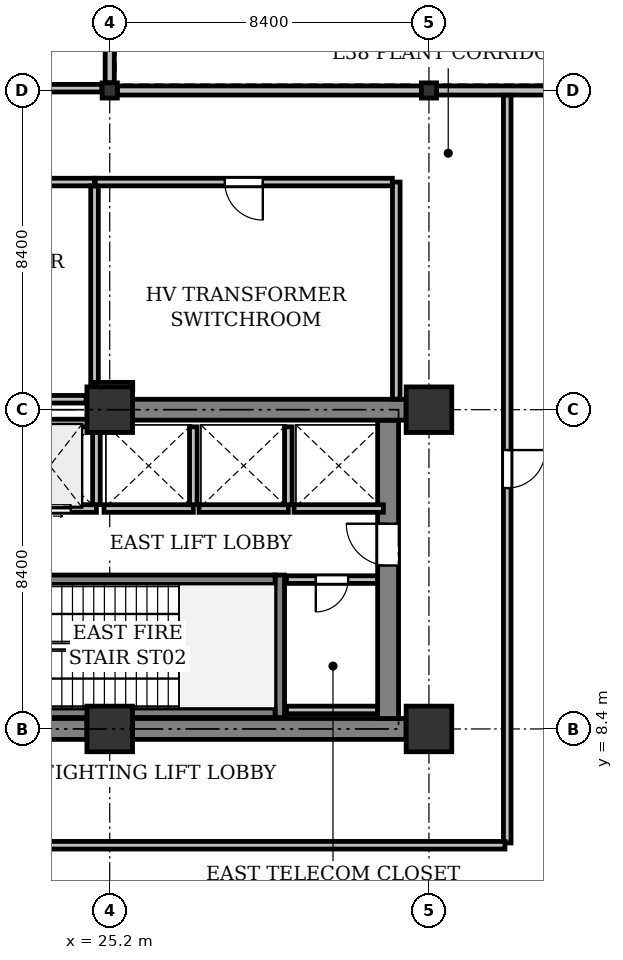
"""IFC4 building model, lengths in metres.
Left out: names, types, materials, properties, quantities, classifications, styles, units other than length and angle.
Written with IfcOpenShell. Run it as: python <this file> out.ifc"""

import sys

from ifc_helpers import new_model, si_unit, direction, frame, frame_2d, origin, origin_2d, place, context, subcontext, project, spatial, rectangle, i_section, extrude, element, fill, save


model = new_model("IFC4")
c1 = context("Model", 3, precision=1e-05, world=origin(), true_north=direction((0.0, 1.0)))
c2 = subcontext(c1, "Body", "Model", "MODEL_VIEW")
j1 = project(units=[si_unit("LENGTHUNIT", "METRE"), si_unit("PLANEANGLEUNIT", "RADIAN")], contexts=[c1])
p1 = place(None, origin())
s1 = spatial("IfcSite", under=j1, at=p1, CompositionType="ELEMENT")
p2 = place(p1, origin())
s2 = spatial("IfcBuilding", under=s1, at=p2, CompositionType="ELEMENT")
p3 = place(p2, frame((0.0, 0.0, 162.3)))
s3 = spatial("IfcBuildingStorey", under=s2, at=p3, CompositionType="ELEMENT", Elevation=162.3)
for number, where, z_axis, x_axis in (
    (1, (25.2, 8.4, 0.0), (0.0, 0.0, 1.0), (1.0, 0.0, 0.0)),
    (2, (25.2, 16.8, 0.0), (0.0, 0.0, 1.0), (1.0, 0.0, 0.0)),
):
    element("IfcColumn", number, at=place(p3, frame(where, z_axis=z_axis, x_axis=x_axis)), inside=s3, PredefinedType="COLUMN", context=c2, shape_type="SweptSolid", body=[
        extrude(rectangle(XDim=1.2, YDim=1.2, at=origin_2d()), origin(), (0.0, 0.0, 1.0), 5.0),
    ])
p4 = place(p3, frame((25.2, 25.2, 0.0), z_axis=(0.0, 0.0, 1.0), x_axis=(1.0, 0.0, 0.0)))
e3 = element("IfcColumn", 3, at=p4, inside=s3, PredefinedType="COLUMN", context=c2, shape_type="SweptSolid", body=[
    extrude(i_section(OverallWidth=0.4, OverallDepth=0.4, WebThickness=0.025, FlangeThickness=0.04, at=origin_2d()), origin(), (0.0, 0.0, 1.0), 5.0),
])
for number, where, z_axis, x_axis in (
    (4, (33.6, 8.4, 0.0), (0.0, 0.0, 1.0), (1.0, 0.0, 0.0)),
    (5, (33.6, 16.8, 0.0), (0.0, 0.0, 1.0), (1.0, 0.0, 0.0)),
):
    element("IfcColumn", number, at=place(p3, frame(where, z_axis=z_axis, x_axis=x_axis)), inside=s3, PredefinedType="COLUMN", context=c2, shape_type="SweptSolid", body=[
        extrude(rectangle(XDim=1.2, YDim=1.2, at=origin_2d()), origin(), (0.0, 0.0, 1.0), 5.0),
    ])
p5 = place(p3, frame((33.6, 25.2, 0.0), z_axis=(0.0, 0.0, 1.0), x_axis=(1.0, 0.0, 0.0)))
e6 = element("IfcColumn", 6, at=p5, inside=s3, PredefinedType="COLUMN", context=c2, shape_type="SweptSolid", body=[
    extrude(i_section(OverallWidth=0.4, OverallDepth=0.4, WebThickness=0.025, FlangeThickness=0.04, at=origin_2d()), origin(), (0.0, 0.0, 1.0), 5.0),
])
for number, where, z_axis, x_axis in (
    (7, (25.2, 33.4, 0.0), (0.0, 0.0, 1.0), (0.0, -1.0, 0.0)),
    (8, (25.4, 25.2, 0.0), (0.0, 0.0, 1.0), (1.0, 0.0, 0.0)),
    (9, (33.8, 25.2, 0.0), (0.0, 0.0, 1.0), (1.0, 0.0, 0.0)),
):
    element("IfcWall", number, at=place(p3, frame(where, z_axis=z_axis, x_axis=x_axis)), inside=s3, PredefinedType="STANDARD", context=c2, shape_type="SweptSolid", body=[
        extrude(rectangle(XDim=8.0, YDim=0.24, at=frame_2d((4.0, 0.0))), origin(), (0.0, 0.0, 1.0), 4.425),
    ])
p6 = place(p3, frame((17.4, 8.4, 0.0), z_axis=(0.0, 0.0, 1.0), x_axis=(1.0, 0.0, 0.0)))
e10 = element("IfcWall", 10, at=p6, inside=s3, PredefinedType="SHEAR", context=c2, shape_type="SweptSolid", body=[
    extrude(rectangle(XDim=7.2, YDim=0.55, at=frame_2d((3.6, 0.0))), origin(), (0.0, 0.0, 1.0), 4.725),
])
p7 = place(p3, frame((25.8, 8.4, 0.0), z_axis=(0.0, 0.0, 1.0), x_axis=(1.0, 0.0, 0.0)))
e11 = element("IfcWall", 11, at=p7, inside=s3, PredefinedType="SHEAR", context=c2, shape_type="SweptSolid", body=[
    extrude(rectangle(XDim=7.2, YDim=0.55, at=frame_2d((3.6, 0.0))), origin(), (0.0, 0.0, 1.0), 4.725),
])
p8 = place(p3, frame((32.525, 8.675, 0.0), z_axis=(0.0, 0.0, 1.0), x_axis=(0.0, 1.0, 0.0)))
e12 = element("IfcWall", 12, at=p8, inside=s3, PredefinedType="SHEAR", context=c2, shape_type="SweptSolid", body=[
    extrude(rectangle(XDim=7.85, YDim=0.55, at=frame_2d((3.925, 0.0))), origin(), (0.0, 0.0, 1.0), 4.725),
])
p9 = place(p8, frame((4.025, 0.0, 0.0)))
e13 = element("IfcOpeningElement", 13, at=p9, cuts=e12, PredefinedType="OPENING", context=c2, shape_type="SweptSolid", body=[
    extrude(rectangle(XDim=1.1, YDim=2.15, at=frame_2d((0.55, 1.075))), frame((0.0, 0.285, 0.0), z_axis=(0.0, -1.0, 0.0), x_axis=(1.0, 0.0, 0.0)), (0.0, 0.0, 1.0), 0.57),
])
p10 = place(p3, frame((25.8, 16.8, 0.0), z_axis=(0.0, 0.0, 1.0), x_axis=(1.0, 0.0, 0.0)))
e14 = element("IfcWall", 14, at=p10, inside=s3, PredefinedType="SHEAR", context=c2, shape_type="SweptSolid", body=[
    extrude(rectangle(XDim=7.2, YDim=0.55, at=frame_2d((3.6, 0.0))), origin(), (0.0, 0.0, 1.0), 4.725),
])
p11 = place(p3, frame((29.675, 8.7, 0.0), z_axis=(0.0, 0.0, 1.0), x_axis=(0.0, 1.0, 0.0)))
e15 = element("IfcWall", 15, at=p11, inside=s3, PredefinedType="SHEAR", context=c2, shape_type="SweptSolid", body=[
    extrude(rectangle(XDim=3.75, YDim=0.25, at=frame_2d((1.875, 0.0))), origin(), (0.0, 0.0, 1.0), 4.725),
])
p12 = place(p3, frame((21.8, 8.825, 0.0), z_axis=(0.0, 0.0, 1.0), x_axis=(1.0, 0.0, 0.0)))
e16 = element("IfcWall", 16, at=p12, inside=s3, PredefinedType="SHEAR", context=c2, shape_type="SweptSolid", body=[
    extrude(rectangle(XDim=7.75, YDim=0.25, at=frame_2d((3.875, 0.0))), origin(), (0.0, 0.0, 1.0), 4.725),
])
p13 = place(p3, frame((21.8, 12.325, 0.0), z_axis=(0.0, 0.0, 1.0), x_axis=(1.0, 0.0, 0.0)))
e17 = element("IfcWall", 17, at=p13, inside=s3, PredefinedType="SHEAR", context=c2, shape_type="SweptSolid", body=[
    extrude(rectangle(XDim=7.75, YDim=0.25, at=frame_2d((3.875, 0.0))), origin(), (0.0, 0.0, 1.0), 4.725),
])
p14 = place(p13, frame((0.22, 0.0, 0.0)))
e18 = element("IfcOpeningElement", 18, at=p14, cuts=e17, PredefinedType="OPENING", context=c2, shape_type="SweptSolid", body=[
    extrude(rectangle(XDim=1.1, YDim=2.15, at=frame_2d((0.55, 1.075))), frame((0.0, 0.135, 0.0), z_axis=(0.0, -1.0, 0.0), x_axis=(1.0, 0.0, 0.0)), (0.0, 0.0, 1.0), 0.27),
])
p15 = place(p3, frame((22.4, 14.2, 0.0), z_axis=(0.0, 0.0, 1.0), x_axis=(1.0, 0.0, 0.0)))
e19 = element("IfcWall", 19, at=p15, inside=s3, PredefinedType="PARTITIONING", context=c2, shape_type="SweptSolid", body=[
    extrude(rectangle(XDim=2.45, YDim=0.2, at=frame_2d((1.225, 0.0))), origin(), (0.0, 0.0, 1.0), 4.725),
])
p16 = place(p15, frame((0.675, 0.0, 0.0)))
e20 = element("IfcOpeningElement", 20, at=p16, cuts=e19, PredefinedType="OPENING", context=c2, shape_type="SweptSolid", body=[
    extrude(rectangle(XDim=1.1, YDim=2.2, at=frame_2d((0.55, 1.1))), frame((0.0, 0.11, 0.0), z_axis=(0.0, -1.0, 0.0), x_axis=(1.0, 0.0, 0.0)), (0.0, 0.0, 1.0), 0.22),
])
p17 = place(p3, frame((24.85, 14.3, 0.0), z_axis=(0.0, 0.0, 1.0), x_axis=(0.0, 1.0, 0.0)))
e21 = element("IfcWall", 21, at=p17, inside=s3, PredefinedType="PARTITIONING", context=c2, shape_type="SweptSolid", body=[
    extrude(rectangle(XDim=2.05, YDim=0.2, at=frame_2d((1.025, 0.0))), origin(), (0.0, 0.0, 1.0), 4.725),
])
p18 = place(p3, frame((22.5, 16.45, 0.0), z_axis=(0.0, 0.0, 1.0), x_axis=(1.0, 0.0, 0.0)))
e22 = element("IfcWall", 22, at=p18, inside=s3, PredefinedType="PARTITIONING", context=c2, shape_type="SweptSolid", body=[
    extrude(rectangle(XDim=2.25, YDim=0.2, at=frame_2d((1.125, 0.0))), origin(), (0.0, 0.0, 1.0), 4.725),
])
p19 = place(p3, frame((25.05, 14.2, 0.0), z_axis=(0.0, 0.0, 1.0), x_axis=(1.0, 0.0, 0.0)))
e23 = element("IfcWall", 23, at=p19, inside=s3, PredefinedType="PARTITIONING", context=c2, shape_type="SweptSolid", body=[
    extrude(rectangle(XDim=2.35, YDim=0.2, at=frame_2d((1.175, 0.0))), origin(), (0.0, 0.0, 1.0), 4.725),
])
p20 = place(p3, frame((27.4, 14.3, 0.0), z_axis=(0.0, 0.0, 1.0), x_axis=(0.0, 1.0, 0.0)))
e24 = element("IfcWall", 24, at=p20, inside=s3, PredefinedType="PARTITIONING", context=c2, shape_type="SweptSolid", body=[
    extrude(rectangle(XDim=2.05, YDim=0.2, at=frame_2d((1.025, 0.0))), origin(), (0.0, 0.0, 1.0), 4.725),
])
p21 = place(p3, frame((27.55, 14.2, 0.0), z_axis=(0.0, 0.0, 1.0), x_axis=(1.0, 0.0, 0.0)))
e25 = element("IfcWall", 25, at=p21, inside=s3, PredefinedType="PARTITIONING", context=c2, shape_type="SweptSolid", body=[
    extrude(rectangle(XDim=2.35, YDim=0.2, at=frame_2d((1.175, 0.0))), origin(), (0.0, 0.0, 1.0), 4.725),
])
p22 = place(p3, frame((29.9, 14.3, 0.0), z_axis=(0.0, 0.0, 1.0), x_axis=(0.0, 1.0, 0.0)))
e26 = element("IfcWall", 26, at=p22, inside=s3, PredefinedType="PARTITIONING", context=c2, shape_type="SweptSolid", body=[
    extrude(rectangle(XDim=2.05, YDim=0.2, at=frame_2d((1.025, 0.0))), origin(), (0.0, 0.0, 1.0), 4.725),
])
p23 = place(p3, frame((30.05, 14.2, 0.0), z_axis=(0.0, 0.0, 1.0), x_axis=(1.0, 0.0, 0.0)))
e27 = element("IfcWall", 27, at=p23, inside=s3, PredefinedType="PARTITIONING", context=c2, shape_type="SweptSolid", body=[
    extrude(rectangle(XDim=2.35, YDim=0.2, at=frame_2d((1.175, 0.0))), origin(), (0.0, 0.0, 1.0), 4.725),
])
p24 = place(p3, frame((32.246, 12.33, 0.0), z_axis=(0.0, 0.0, 1.0), x_axis=(-1.0, 0.0, 0.0)))
e28 = element("IfcWall", 28, at=p24, inside=s3, PredefinedType="PARTITIONING", context=c2, shape_type="SweptSolid", body=[
    extrude(rectangle(XDim=2.396, YDim=0.2, at=frame_2d((1.198, 0.0))), origin(), (0.0, 0.0, 1.0), 4.725),
])
p25 = place(p24, frame((0.773, 0.0, 0.0)))
e29 = element("IfcOpeningElement", 29, at=p25, cuts=e28, PredefinedType="OPENING", context=c2, shape_type="SweptSolid", body=[
    extrude(rectangle(XDim=0.85, YDim=2.15, at=frame_2d((0.425, 1.075))), frame((0.0, 0.11, 0.0), z_axis=(0.0, -1.0, 0.0), x_axis=(1.0, 0.0, 0.0)), (0.0, 0.0, 1.0), 0.22),
])
p26 = place(p3, frame((29.85, 8.9, 0.0), z_axis=(0.0, 0.0, 1.0), x_axis=(1.0, 0.0, 0.0)))
e30 = element("IfcWall", 30, at=p26, inside=s3, PredefinedType="PARTITIONING", context=c2, shape_type="SweptSolid", body=[
    extrude(rectangle(XDim=2.396, YDim=0.2, at=frame_2d((1.198, 0.0))), origin(), (0.0, 0.0, 1.0), 4.725),
])
p27 = place(p3, frame((35.66, 25.076, 0.0), z_axis=(0.0, 0.0, 1.0), x_axis=(0.0, -1.0, 0.0)))
e31 = element("IfcWall", 31, at=p27, inside=s3, PredefinedType="PARTITIONING", context=c2, shape_type="SweptSolid", body=[
    extrude(rectangle(XDim=19.676, YDim=0.2, at=frame_2d((9.838, 0.0))), origin(), (0.0, 0.0, 1.0), 3.825),
])
p28 = place(p27, frame((9.338, 0.0, 0.0)))
e32 = element("IfcOpeningElement", 32, at=p28, cuts=e31, PredefinedType="OPENING", context=c2, shape_type="SweptSolid", body=[
    extrude(rectangle(XDim=1.0, YDim=2.15, at=frame_2d((0.5, 1.075))), frame((0.0, 0.11, 0.0), z_axis=(0.0, -1.0, 0.0), x_axis=(1.0, 0.0, 0.0)), (0.0, 0.0, 1.0), 0.22),
])
p29 = place(p3, frame((35.6, 5.34, 0.0), z_axis=(0.0, 0.0, 1.0), x_axis=(-1.0, 0.0, 0.0)))
e33 = element("IfcWall", 33, at=p29, inside=s3, PredefinedType="PARTITIONING", context=c2, shape_type="SweptSolid", body=[
    extrude(rectangle(XDim=14.496, YDim=0.2, at=frame_2d((7.248, 0.0))), origin(), (0.0, 0.0, 1.0), 3.709),
])
p30 = place(p3, frame((24.8, 22.79, 0.0), z_axis=(0.0, 0.0, 1.0), x_axis=(-1.0, 0.0, 0.0)))
e34 = element("IfcWall", 34, at=p30, inside=s3, PredefinedType="PARTITIONING", context=c2, shape_type="SweptSolid", body=[
    extrude(rectangle(XDim=7.94, YDim=0.2, at=frame_2d((3.97, 0.0))), origin(), (0.0, 0.0, 1.0), 3.709),
])
p31 = place(p30, frame((3.47, 0.0, 0.0)))
e35 = element("IfcOpeningElement", 35, at=p31, cuts=e34, PredefinedType="OPENING", context=c2, shape_type="SweptSolid", body=[
    extrude(rectangle(XDim=1.0, YDim=2.15, at=frame_2d((0.5, 1.075))), frame((0.0, 0.11, 0.0), z_axis=(0.0, -1.0, 0.0), x_axis=(1.0, 0.0, 0.0)), (0.0, 0.0, 1.0), 0.22),
])
p32 = place(p3, frame((17.42, 17.075, 0.0), z_axis=(0.0, 0.0, 1.0), x_axis=(1.0, 0.0, 0.0)))
e36 = element("IfcWall", 36, at=p32, inside=s3, PredefinedType="PARTITIONING", context=c2, shape_type="SweptSolid", body=[
    extrude(rectangle(XDim=7.16, YDim=0.2, at=frame_2d((3.58, 0.0))), origin(), (0.0, 0.0, 1.0), 3.825),
])
p33 = place(p3, frame((24.8, 17.42, 0.0), z_axis=(0.0, 0.0, 1.0), x_axis=(0.0, 1.0, 0.0)))
e37 = element("IfcWall", 37, at=p33, inside=s3, PredefinedType="PARTITIONING", context=c2, shape_type="SweptSolid", body=[
    extrude(rectangle(XDim=5.266, YDim=0.2, at=frame_2d((2.633, 0.0))), origin(), (0.0, 0.0, 1.0), 4.725),
])
p34 = place(p3, frame((32.74, 17.079, 0.0), z_axis=(0.0, 0.0, 1.0), x_axis=(0.0, 1.0, 0.0)))
e38 = element("IfcWall", 38, at=p34, inside=s3, PredefinedType="PARTITIONING", context=c2, shape_type="SweptSolid", body=[
    extrude(rectangle(XDim=5.711, YDim=0.2, at=frame_2d((2.855, 0.0))), origin(), (0.0, 0.0, 1.0), 4.725),
])
p35 = place(p3, frame((32.636, 22.79, 0.0), z_axis=(0.0, 0.0, 1.0), x_axis=(-1.0, 0.0, 0.0)))
e39 = element("IfcWall", 39, at=p35, inside=s3, PredefinedType="PARTITIONING", context=c2, shape_type="SweptSolid", body=[
    extrude(rectangle(XDim=7.816, YDim=0.2, at=frame_2d((3.908, 0.0))), origin(), (0.0, 0.0, 1.0), 3.709),
])
p36 = place(p35, frame((3.408, 0.0, 0.0)))
e40 = element("IfcOpeningElement", 40, at=p36, cuts=e39, PredefinedType="OPENING", context=c2, shape_type="SweptSolid", body=[
    extrude(rectangle(XDim=1.0, YDim=2.15, at=frame_2d((0.5, 1.075))), frame((0.0, 0.11, 0.0), z_axis=(0.0, -1.0, 0.0), x_axis=(1.0, 0.0, 0.0)), (0.0, 0.0, 1.0), 0.22),
])
p37 = place(p3, frame((24.82, 17.42, 0.0), z_axis=(0.0, 0.0, 1.0), x_axis=(0.999999724019, -0.000742941845, 0.0)))
e41 = element("IfcWall", 41, at=p37, inside=s3, PredefinedType="PARTITIONING", context=c2, shape_type="SweptSolid", body=[
    extrude(rectangle(XDim=0.986, YDim=0.2, at=frame_2d((0.493, 0.0))), origin(), (0.0, 0.0, 1.0), 3.709),
])
p38 = place(p3, frame((20.064, 25.26, 0.0), z_axis=(0.0, 0.0, 1.0), x_axis=(1.0, 0.0, 0.0)))
e42 = element("IfcWall", 42, at=p38, inside=s3, PredefinedType="PARTITIONING", context=c2, shape_type="SweptSolid", body=[
    extrude(rectangle(XDim=4.931, YDim=0.2, at=frame_2d((2.466, 0.0))), origin(), (0.0, 0.0, 1.0), 3.825),
])
p39 = place(p38, frame((1.966, 0.0, 0.0)))
e43 = element("IfcOpeningElement", 43, at=p39, cuts=e42, PredefinedType="OPENING", context=c2, shape_type="SweptSolid", body=[
    extrude(rectangle(XDim=1.0, YDim=2.15, at=frame_2d((0.5, 1.075))), frame((0.0, 0.11, 0.0), z_axis=(0.0, -1.0, 0.0), x_axis=(1.0, 0.0, 0.0)), (0.0, 0.0, 1.0), 0.22),
])
p40 = place(p9, origin())
e44 = element("IfcDoor", 44, at=p40, inside=s3, OperationType="SINGLE_SWING_RIGHT", PredefinedType="DOOR", context=c2, shape_type="SweptSolid", body=[
    extrude(rectangle(XDim=1.1, YDim=2.15, at=frame_2d((0.55, 1.075))), frame((0.0, 0.025, 0.0), z_axis=(0.0, -1.0, 0.0), x_axis=(1.0, 0.0, 0.0)), (0.0, 0.0, 1.0), 0.05),
])
fill(e13, e44)
p41 = place(p16, origin())
e45 = element("IfcDoor", 45, at=p41, inside=s3, OperationType="DOUBLE_DOOR_SLIDING", PredefinedType="DOOR", context=c2, shape_type="SweptSolid", body=[
    extrude(rectangle(XDim=1.1, YDim=2.2, at=frame_2d((0.55, 1.1))), frame((0.0, 0.025, 0.0), z_axis=(0.0, -1.0, 0.0), x_axis=(1.0, 0.0, 0.0)), (0.0, 0.0, 1.0), 0.05),
])
fill(e20, e45)
p42 = place(p25, origin())
e46 = element("IfcDoor", 46, at=p42, inside=s3, OperationType="SINGLE_SWING_RIGHT", PredefinedType="DOOR", context=c2, shape_type="SweptSolid", body=[
    extrude(rectangle(XDim=0.85, YDim=2.15, at=frame_2d((0.425, 1.075))), frame((0.0, 0.025, 0.0), z_axis=(0.0, -1.0, 0.0), x_axis=(1.0, 0.0, 0.0)), (0.0, 0.0, 1.0), 0.05),
])
fill(e29, e46)
p43 = place(p28, origin())
e47 = element("IfcDoor", 47, at=p43, inside=s3, OperationType="SINGLE_SWING_LEFT", PredefinedType="DOOR", context=c2, shape_type="SweptSolid", body=[
    extrude(rectangle(XDim=1.0, YDim=2.15, at=frame_2d((0.5, 1.075))), frame((0.0, 0.025, 0.0), z_axis=(0.0, -1.0, 0.0), x_axis=(1.0, 0.0, 0.0)), (0.0, 0.0, 1.0), 0.05),
])
fill(e32, e47)
p44 = place(p36, origin())
e48 = element("IfcDoor", 48, at=p44, inside=s3, OperationType="SINGLE_SWING_LEFT", PredefinedType="DOOR", context=c2, shape_type="SweptSolid", body=[
    extrude(rectangle(XDim=1.0, YDim=2.15, at=frame_2d((0.5, 1.075))), frame((0.0, 0.025, 0.0), z_axis=(0.0, -1.0, 0.0), x_axis=(1.0, 0.0, 0.0)), (0.0, 0.0, 1.0), 0.05),
])
fill(e40, e48)
save(model, sys.argv[1])
